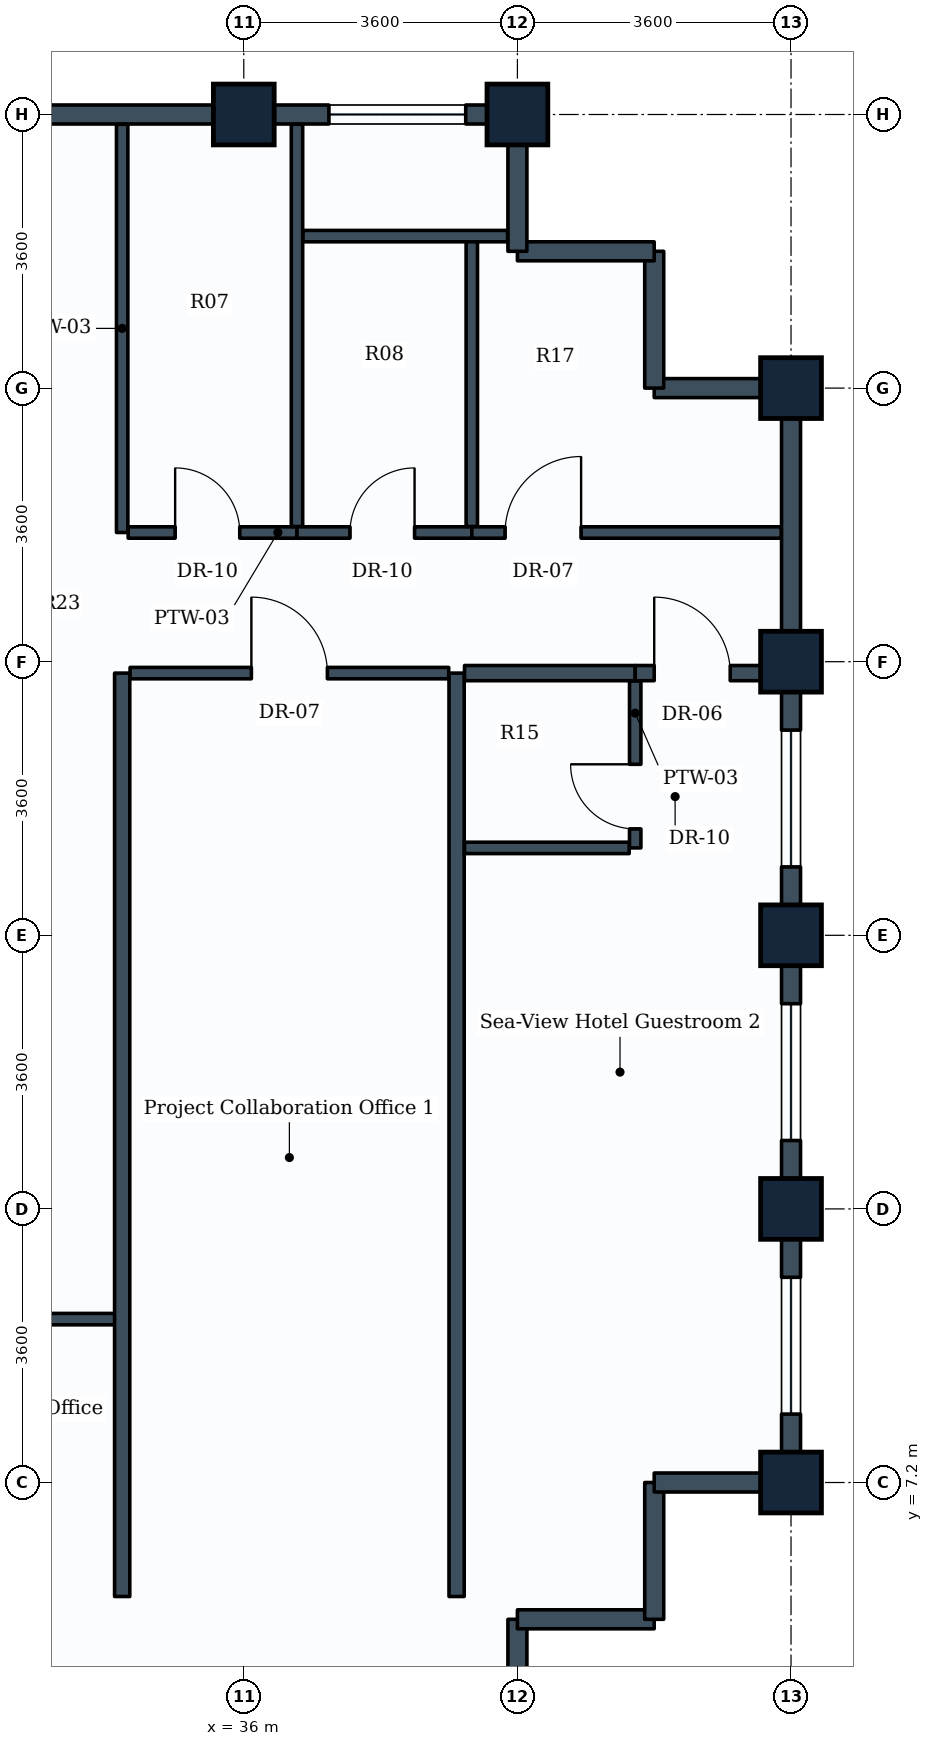
"""IFC4 building model, lengths in metres.
Left out: names, types, materials, properties, quantities, classifications, styles, units other than length and angle.
Written with IfcOpenShell. Run it as: python <this file> out.ifc"""

import sys

from ifc_helpers import new_model, si_unit, direction, frame, frame_2d, origin, origin_2d, place, context, subcontext, project, spatial, rectangle, extrude, element, fill, save


model = new_model("IFC4")
c1 = context("Model", 3, precision=1e-05, world=origin(), true_north=direction((0.0, 1.0)))
c2 = subcontext(c1, "Body", "Model", "MODEL_VIEW")
j1 = project(units=[si_unit("LENGTHUNIT", "METRE"), si_unit("PLANEANGLEUNIT", "RADIAN")], contexts=[c1])
p1 = place(None, origin())
s1 = spatial("IfcSite", under=j1, at=p1, CompositionType="ELEMENT")
p2 = place(p1, origin())
s2 = spatial("IfcBuilding", under=s1, at=p2, CompositionType="ELEMENT")
p3 = place(p2, frame((0.0, 0.0, 235.4)))
s3 = spatial("IfcBuildingStorey", under=s2, at=p3, CompositionType="ELEMENT", Elevation=235.4)
for number, where, z_axis, x_axis in (
    (1, (36.0, 25.2, 0.0), (0.0, 0.0, 1.0), (1.0, 0.0, 0.0)),
    (2, (39.6, 25.2, 0.0), (0.0, 0.0, 1.0), (1.0, 0.0, 0.0)),
    (3, (43.2, 7.2, 0.0), (0.0, 0.0, 1.0), (1.0, 0.0, 0.0)),
    (4, (43.2, 10.8, 0.0), (0.0, 0.0, 1.0), (0.0, 1.0, 0.0)),
    (5, (43.2, 14.4, 0.0), (0.0, 0.0, 1.0), (0.0, 1.0, 0.0)),
    (6, (43.2, 18.0, 0.0), (0.0, 0.0, 1.0), (0.0, 1.0, 0.0)),
    (7, (43.2, 21.6, 0.0), (0.0, 0.0, 1.0), (0.0, 1.0, 0.0)),
):
    element("IfcColumn", number, at=place(p3, frame(where, z_axis=z_axis, x_axis=x_axis)), inside=s3, PredefinedType="COLUMN", context=c2, shape_type="SweptSolid", body=[
        extrude(rectangle(XDim=0.8, YDim=0.8, at=origin_2d()), origin(), (0.0, 0.0, 1.0), 3.6),
    ])
p4 = place(p3, frame((39.6, 5.4, 0.0), z_axis=(0.0, 0.0, 1.0), x_axis=(0.0, -1.0, 0.0)))
e8 = element("IfcWall", 8, at=p4, inside=s3, PredefinedType="STANDARD", context=c2, shape_type="SweptSolid", body=[
    extrude(rectangle(XDim=1.8, YDim=0.25, at=frame_2d((0.9, 0.0))), origin(), (0.0, 0.0, 1.0), 2.83),
])
p5 = place(p3, frame((41.4, 5.4, 0.0), z_axis=(0.0, 0.0, 1.0), x_axis=(-1.0, 0.0, 0.0)))
e9 = element("IfcWall", 9, at=p5, inside=s3, PredefinedType="STANDARD", context=c2, shape_type="SweptSolid", body=[
    extrude(rectangle(XDim=1.8, YDim=0.25, at=frame_2d((0.9, 0.0))), origin(), (0.0, 0.0, 1.0), 3.335),
])
p6 = place(p3, frame((41.4, 7.2, 0.0), z_axis=(0.0, 0.0, 1.0), x_axis=(0.0, -1.0, 0.0)))
e10 = element("IfcWall", 10, at=p6, inside=s3, PredefinedType="STANDARD", context=c2, shape_type="SweptSolid", body=[
    extrude(rectangle(XDim=1.8, YDim=0.25, at=frame_2d((0.9, 0.0))), origin(), (0.0, 0.0, 1.0), 3.335),
])
p7 = place(p3, frame((43.2, 7.2, 0.0), z_axis=(0.0, 0.0, 1.0), x_axis=(-1.0, 0.0, 0.0)))
e11 = element("IfcWall", 11, at=p7, inside=s3, PredefinedType="STANDARD", context=c2, shape_type="SweptSolid", body=[
    extrude(rectangle(XDim=1.8, YDim=0.25, at=frame_2d((0.9, 0.0))), origin(), (0.0, 0.0, 1.0), 2.83),
])
p8 = place(p3, frame((43.2, 10.8, 0.0), z_axis=(0.0, 0.0, 1.0), x_axis=(0.0, -1.0, 0.0)))
e12 = element("IfcWall", 12, at=p8, inside=s3, PredefinedType="STANDARD", context=c2, shape_type="SweptSolid", body=[
    extrude(rectangle(XDim=3.6, YDim=0.25, at=frame_2d((1.8, 0.0))), origin(), (0.0, 0.0, 1.0), 2.83),
])
p9 = place(p8, frame((0.9, 0.0, 0.85)))
e13 = element("IfcOpeningElement", 13, at=p9, cuts=e12, PredefinedType="OPENING", context=c2, shape_type="SweptSolid", body=[
    extrude(rectangle(XDim=1.8, YDim=1.35, at=frame_2d((0.9, 0.675))), frame((0.0, 0.135, 0.0), z_axis=(0.0, -1.0, 0.0), x_axis=(1.0, 0.0, 0.0)), (0.0, 0.0, 1.0), 0.27),
])
p10 = place(p3, frame((43.2, 14.4, 0.0), z_axis=(0.0, 0.0, 1.0), x_axis=(0.0, -1.0, 0.0)))
e14 = element("IfcWall", 14, at=p10, inside=s3, PredefinedType="STANDARD", context=c2, shape_type="SweptSolid", body=[
    extrude(rectangle(XDim=3.6, YDim=0.25, at=frame_2d((1.8, 0.0))), origin(), (0.0, 0.0, 1.0), 2.83),
])
p11 = place(p10, frame((0.9, 0.0, 0.85)))
e15 = element("IfcOpeningElement", 15, at=p11, cuts=e14, PredefinedType="OPENING", context=c2, shape_type="SweptSolid", body=[
    extrude(rectangle(XDim=1.8, YDim=1.35, at=frame_2d((0.9, 0.675))), frame((0.0, 0.135, 0.0), z_axis=(0.0, -1.0, 0.0), x_axis=(1.0, 0.0, 0.0)), (0.0, 0.0, 1.0), 0.27),
])
p12 = place(p3, frame((43.2, 18.0, 0.0), z_axis=(0.0, 0.0, 1.0), x_axis=(0.0, -1.0, 0.0)))
e16 = element("IfcWall", 16, at=p12, inside=s3, PredefinedType="STANDARD", context=c2, shape_type="SweptSolid", body=[
    extrude(rectangle(XDim=3.6, YDim=0.25, at=frame_2d((1.8, 0.0))), origin(), (0.0, 0.0, 1.0), 2.83),
])
p13 = place(p12, frame((0.9, 0.0, 0.85)))
e17 = element("IfcOpeningElement", 17, at=p13, cuts=e16, PredefinedType="OPENING", context=c2, shape_type="SweptSolid", body=[
    extrude(rectangle(XDim=1.8, YDim=1.35, at=frame_2d((0.9, 0.675))), frame((0.0, 0.135, 0.0), z_axis=(0.0, -1.0, 0.0), x_axis=(1.0, 0.0, 0.0)), (0.0, 0.0, 1.0), 0.27),
])
p14 = place(p3, frame((43.2, 21.6, 0.0), z_axis=(0.0, 0.0, 1.0), x_axis=(0.0, -1.0, 0.0)))
e18 = element("IfcWall", 18, at=p14, inside=s3, PredefinedType="STANDARD", context=c2, shape_type="SweptSolid", body=[
    extrude(rectangle(XDim=3.6, YDim=0.25, at=frame_2d((1.8, 0.0))), origin(), (0.0, 0.0, 1.0), 2.83),
])
p15 = place(p3, frame((41.4, 21.6, 0.0), z_axis=(0.0, 0.0, 1.0), x_axis=(1.0, 0.0, 0.0)))
e19 = element("IfcWall", 19, at=p15, inside=s3, PredefinedType="STANDARD", context=c2, shape_type="SweptSolid", body=[
    extrude(rectangle(XDim=1.8, YDim=0.25, at=frame_2d((0.9, 0.0))), origin(), (0.0, 0.0, 1.0), 2.83),
])
for number, where, z_axis, x_axis in (
    (20, (41.4, 23.4, 0.0), (0.0, 0.0, 1.0), (0.0, -1.0, 0.0)),
    (21, (39.6, 23.4, 0.0), (0.0, 0.0, 1.0), (1.0, 0.0, 0.0)),
):
    element("IfcWall", number, at=place(p3, frame(where, z_axis=z_axis, x_axis=x_axis)), inside=s3, PredefinedType="STANDARD", context=c2, shape_type="SweptSolid", body=[
        extrude(rectangle(XDim=1.8, YDim=0.25, at=frame_2d((0.9, 0.0))), origin(), (0.0, 0.0, 1.0), 3.335),
    ])
p16 = place(p3, frame((39.6, 25.2, 0.0), z_axis=(0.0, 0.0, 1.0), x_axis=(0.0, -1.0, 0.0)))
e22 = element("IfcWall", 22, at=p16, inside=s3, PredefinedType="STANDARD", context=c2, shape_type="SweptSolid", body=[
    extrude(rectangle(XDim=1.8, YDim=0.25, at=frame_2d((0.9, 0.0))), origin(), (0.0, 0.0, 1.0), 2.83),
])
p17 = place(p3, frame((36.0, 25.2, 0.0), z_axis=(0.0, 0.0, 1.0), x_axis=(1.0, 0.0, 0.0)))
e23 = element("IfcWall", 23, at=p17, inside=s3, PredefinedType="STANDARD", context=c2, shape_type="SweptSolid", body=[
    extrude(rectangle(XDim=3.6, YDim=0.25, at=frame_2d((1.8, 0.0))), origin(), (0.0, 0.0, 1.0), 2.83),
])
p18 = place(p17, frame((1.12, 0.0, 0.85)))
e24 = element("IfcOpeningElement", 24, at=p18, cuts=e23, PredefinedType="OPENING", context=c2, shape_type="SweptSolid", body=[
    extrude(rectangle(XDim=1.8, YDim=1.35, at=frame_2d((0.9, 0.675))), frame((0.0, 0.135, 0.0), z_axis=(0.0, -1.0, 0.0), x_axis=(1.0, 0.0, 0.0)), (0.0, 0.0, 1.0), 0.27),
])
p19 = place(p3, frame((32.4, 25.2, 0.0), z_axis=(0.0, 0.0, 1.0), x_axis=(1.0, 0.0, 0.0)))
e25 = element("IfcWall", 25, at=p19, inside=s3, PredefinedType="STANDARD", context=c2, shape_type="SweptSolid", body=[
    extrude(rectangle(XDim=3.6, YDim=0.25, at=frame_2d((1.8, 0.0))), origin(), (0.0, 0.0, 1.0), 2.83),
])
p20 = place(p3, frame((34.4, 19.7, 0.0), z_axis=(0.0, 0.0, 1.0), x_axis=(0.0, 1.0, 0.0)))
e26 = element("IfcWall", 26, at=p20, inside=s3, PredefinedType="PARTITIONING", context=c2, shape_type="SweptSolid", body=[
    extrude(rectangle(XDim=5.371, YDim=0.15, at=frame_2d((2.686, 0.0))), origin(), (0.0, 0.0, 1.0), 2.83),
])
p21 = place(p3, frame((34.479, 19.7, 0.0), z_axis=(0.0, 0.0, 1.0), x_axis=(1.0, 0.0, 0.0)))
e27 = element("IfcWall", 27, at=p21, inside=s3, PredefinedType="PARTITIONING", context=c2, shape_type="SweptSolid", body=[
    extrude(rectangle(XDim=2.221, YDim=0.15, at=frame_2d((1.11, 0.0))), origin(), (0.0, 0.0, 1.0), 3.02),
])
p22 = place(p21, frame((0.618, 0.0, 0.0)))
e28 = element("IfcOpeningElement", 28, at=p22, cuts=e27, PredefinedType="OPENING", context=c2, shape_type="SweptSolid", body=[
    extrude(rectangle(XDim=0.85, YDim=2.1, at=frame_2d((0.425, 1.05))), frame((0.0, 0.085, 0.0), z_axis=(0.0, -1.0, 0.0), x_axis=(1.0, 0.0, 0.0)), (0.0, 0.0, 1.0), 0.17),
])
p23 = place(p3, frame((36.7, 19.779, 0.0), z_axis=(0.0, 0.0, 1.0), x_axis=(0.0, 1.0, 0.0)))
e29 = element("IfcWall", 29, at=p23, inside=s3, PredefinedType="PARTITIONING", context=c2, shape_type="SweptSolid", body=[
    extrude(rectangle(XDim=5.292, YDim=0.15, at=frame_2d((2.646, 0.0))), origin(), (0.0, 0.0, 1.0), 2.83),
])
p24 = place(p3, frame((36.7, 19.7, 0.0), z_axis=(0.0, 0.0, 1.0), x_axis=(1.0, 0.0, 0.0)))
e30 = element("IfcWall", 30, at=p24, inside=s3, PredefinedType="PARTITIONING", context=c2, shape_type="SweptSolid", body=[
    extrude(rectangle(XDim=2.3, YDim=0.15, at=frame_2d((1.15, 0.0))), origin(), (0.0, 0.0, 1.0), 3.335),
])
p25 = place(p24, frame((0.697, 0.0, 0.0)))
e31 = element("IfcOpeningElement", 31, at=p25, cuts=e30, PredefinedType="OPENING", context=c2, shape_type="SweptSolid", body=[
    extrude(rectangle(XDim=0.85, YDim=2.1, at=frame_2d((0.425, 1.05))), frame((0.0, 0.085, 0.0), z_axis=(0.0, -1.0, 0.0), x_axis=(1.0, 0.0, 0.0)), (0.0, 0.0, 1.0), 0.17),
])
p26 = place(p3, frame((39.0, 19.779, 0.0), z_axis=(0.0, 0.0, 1.0), x_axis=(0.0, 1.0, 0.0)))
e32 = element("IfcWall", 32, at=p26, inside=s3, PredefinedType="PARTITIONING", context=c2, shape_type="SweptSolid", body=[
    extrude(rectangle(XDim=3.821, YDim=0.15, at=frame_2d((1.911, 0.0))), origin(), (0.0, 0.0, 1.0), 3.335),
])
p27 = place(p3, frame((36.779, 23.6, 0.0), z_axis=(0.0, 0.0, 1.0), x_axis=(1.0, 0.0, 0.0)))
e33 = element("IfcWall", 33, at=p27, inside=s3, PredefinedType="PARTITIONING", context=c2, shape_type="SweptSolid", body=[
    extrude(rectangle(XDim=2.692, YDim=0.15, at=frame_2d((1.346, 0.0))), origin(), (0.0, 0.0, 1.0), 3.335),
])
p28 = place(p3, frame((28.879, 9.35, 0.0), z_axis=(0.0, 0.0, 1.0), x_axis=(1.0, 0.0, 0.0)))
e34 = element("IfcWall", 34, at=p28, inside=s3, PredefinedType="PARTITIONING", context=c2, shape_type="SweptSolid", body=[
    extrude(rectangle(XDim=5.521, YDim=0.15, at=frame_2d((2.76, 0.0))), origin(), (0.0, 0.0, 1.0), 3.335),
])
p29 = place(p28, frame((0.36, 0.0, 0.0)))
e35 = element("IfcOpeningElement", 35, at=p29, cuts=e34, PredefinedType="OPENING", context=c2, shape_type="SweptSolid", body=[
    extrude(rectangle(XDim=1.0, YDim=2.1, at=frame_2d((0.5, 1.05))), frame((0.0, 0.085, 0.0), z_axis=(0.0, -1.0, 0.0), x_axis=(1.0, 0.0, 0.0)), (0.0, 0.0, 1.0), 0.17),
])
for number, where, z_axis, x_axis in (
    (36, (34.4, 5.7, 0.0), (0.0, 0.0, 1.0), (0.0, 1.0, 0.0)),
    (37, (38.8, 5.7, 0.0), (0.0, 0.0, 1.0), (0.0, 1.0, 0.0)),
):
    element("IfcWall", number, at=place(p3, frame(where, z_axis=z_axis, x_axis=x_axis)), inside=s3, PredefinedType="PARTITIONING", context=c2, shape_type="SweptSolid", body=[
        extrude(rectangle(XDim=12.15, YDim=0.2, at=frame_2d((6.075, 0.0))), origin(), (0.0, 0.0, 1.0), 3.03),
    ])
p30 = place(p3, frame((34.504, 17.85, 0.0), z_axis=(0.0, 0.0, 1.0), x_axis=(1.0, 0.0, 0.0)))
e38 = element("IfcWall", 38, at=p30, inside=s3, PredefinedType="PARTITIONING", context=c2, shape_type="SweptSolid", body=[
    extrude(rectangle(XDim=4.192, YDim=0.15, at=frame_2d((2.096, 0.0))), origin(), (0.0, 0.0, 1.0), 3.02),
])
p31 = place(p30, frame((1.596, 0.0, 0.0)))
e39 = element("IfcOpeningElement", 39, at=p31, cuts=e38, PredefinedType="OPENING", context=c2, shape_type="SweptSolid", body=[
    extrude(rectangle(XDim=1.0, YDim=2.1, at=frame_2d((0.5, 1.05))), frame((0.0, 0.085, 0.0), z_axis=(0.0, -1.0, 0.0), x_axis=(1.0, 0.0, 0.0)), (0.0, 0.0, 1.0), 0.17),
])
p32 = place(p3, frame((38.904, 17.85, 0.0), z_axis=(0.0, 0.0, 1.0), x_axis=(1.0, 0.0, 0.0)))
e40 = element("IfcWall", 40, at=p32, inside=s3, PredefinedType="PARTITIONING", context=c2, shape_type="SweptSolid", body=[
    extrude(rectangle(XDim=2.246, YDim=0.2, at=frame_2d((1.123, 0.0))), origin(), (0.0, 0.0, 1.0), 3.335),
])
p33 = place(p3, frame((41.15, 17.85, 0.0), z_axis=(0.0, 0.0, 1.0), x_axis=(1.0, 0.0, 0.0)))
e41 = element("IfcWall", 41, at=p33, inside=s3, PredefinedType="PARTITIONING", context=c2, shape_type="SweptSolid", body=[
    extrude(rectangle(XDim=1.921, YDim=0.2, at=frame_2d((0.96, 0.0))), origin(), (0.0, 0.0, 1.0), 2.83),
])
p34 = place(p33, frame((0.25, 0.0, 0.0)))
e42 = element("IfcOpeningElement", 42, at=p34, cuts=e41, PredefinedType="OPENING", context=c2, shape_type="SweptSolid", body=[
    extrude(rectangle(XDim=1.0, YDim=2.1, at=frame_2d((0.5, 1.05))), frame((0.0, 0.11, 0.0), z_axis=(0.0, -1.0, 0.0), x_axis=(1.0, 0.0, 0.0)), (0.0, 0.0, 1.0), 0.22),
])
p35 = place(p3, frame((41.15, 15.55, 0.0), z_axis=(0.0, 0.0, 1.0), x_axis=(0.0, 1.0, 0.0)))
e43 = element("IfcWall", 43, at=p35, inside=s3, PredefinedType="PARTITIONING", context=c2, shape_type="SweptSolid", body=[
    extrude(rectangle(XDim=2.196, YDim=0.15, at=frame_2d((1.098, 0.0))), origin(), (0.0, 0.0, 1.0), 3.335),
])
p36 = place(p35, frame((0.25, 0.0, 0.0)))
e44 = element("IfcOpeningElement", 44, at=p36, cuts=e43, PredefinedType="OPENING", context=c2, shape_type="SweptSolid", body=[
    extrude(rectangle(XDim=0.85, YDim=2.1, at=frame_2d((0.425, 1.05))), frame((0.0, 0.085, 0.0), z_axis=(0.0, -1.0, 0.0), x_axis=(1.0, 0.0, 0.0)), (0.0, 0.0, 1.0), 0.17),
])
p37 = place(p3, frame((38.904, 15.55, 0.0), z_axis=(0.0, 0.0, 1.0), x_axis=(1.0, 0.0, 0.0)))
e45 = element("IfcWall", 45, at=p37, inside=s3, PredefinedType="PARTITIONING", context=c2, shape_type="SweptSolid", body=[
    extrude(rectangle(XDim=2.167, YDim=0.15, at=frame_2d((1.083, 0.0))), origin(), (0.0, 0.0, 1.0), 3.335),
])
p38 = place(p3, frame((39.0, 19.7, 0.0), z_axis=(0.0, 0.0, 1.0), x_axis=(1.0, 0.0, 0.0)))
e46 = element("IfcWall", 46, at=p38, inside=s3, PredefinedType="PARTITIONING", context=c2, shape_type="SweptSolid", body=[
    extrude(rectangle(XDim=4.071, YDim=0.15, at=frame_2d((2.036, 0.0))), origin(), (0.0, 0.0, 1.0), 2.83),
])
p39 = place(p38, frame((0.438, 0.0, 0.0)))
e47 = element("IfcOpeningElement", 47, at=p39, cuts=e46, PredefinedType="OPENING", context=c2, shape_type="SweptSolid", body=[
    extrude(rectangle(XDim=1.0, YDim=2.1, at=frame_2d((0.5, 1.05))), frame((0.0, 0.085, 0.0), z_axis=(0.0, -1.0, 0.0), x_axis=(1.0, 0.0, 0.0)), (0.0, 0.0, 1.0), 0.17),
])
p40 = place(p9, origin())
e48 = element("IfcWindow", 48, at=p40, inside=s3, PartitioningType="SINGLE_PANEL", PredefinedType="WINDOW", context=c2, shape_type="SweptSolid", body=[
    extrude(rectangle(XDim=1.8, YDim=1.35, at=frame_2d((0.9, 0.675))), frame((0.0, 0.03, 0.0), z_axis=(0.0, -1.0, 0.0), x_axis=(1.0, 0.0, 0.0)), (0.0, 0.0, 1.0), 0.06),
])
fill(e13, e48)
p41 = place(p11, origin())
e49 = element("IfcWindow", 49, at=p41, inside=s3, PartitioningType="SINGLE_PANEL", PredefinedType="WINDOW", context=c2, shape_type="SweptSolid", body=[
    extrude(rectangle(XDim=1.8, YDim=1.35, at=frame_2d((0.9, 0.675))), frame((0.0, 0.03, 0.0), z_axis=(0.0, -1.0, 0.0), x_axis=(1.0, 0.0, 0.0)), (0.0, 0.0, 1.0), 0.06),
])
fill(e15, e49)
p42 = place(p13, origin())
e50 = element("IfcWindow", 50, at=p42, inside=s3, PartitioningType="SINGLE_PANEL", PredefinedType="WINDOW", context=c2, shape_type="SweptSolid", body=[
    extrude(rectangle(XDim=1.8, YDim=1.35, at=frame_2d((0.9, 0.675))), frame((0.0, 0.03, 0.0), z_axis=(0.0, -1.0, 0.0), x_axis=(1.0, 0.0, 0.0)), (0.0, 0.0, 1.0), 0.06),
])
fill(e17, e50)
p43 = place(p18, origin())
e51 = element("IfcWindow", 51, at=p43, inside=s3, PartitioningType="SINGLE_PANEL", PredefinedType="WINDOW", context=c2, shape_type="SweptSolid", body=[
    extrude(rectangle(XDim=1.8, YDim=1.35, at=frame_2d((0.9, 0.675))), frame((0.0, 0.03, 0.0), z_axis=(0.0, -1.0, 0.0), x_axis=(1.0, 0.0, 0.0)), (0.0, 0.0, 1.0), 0.06),
])
fill(e24, e51)
p44 = place(p22, origin())
e52 = element("IfcDoor", 52, at=p44, inside=s3, OperationType="SINGLE_SWING_LEFT", PredefinedType="DOOR", context=c2, shape_type="SweptSolid", body=[
    extrude(rectangle(XDim=0.85, YDim=2.1, at=frame_2d((0.425, 1.05))), frame((0.0, 0.025, 0.0), z_axis=(0.0, -1.0, 0.0), x_axis=(1.0, 0.0, 0.0)), (0.0, 0.0, 1.0), 0.05),
])
fill(e28, e52)
p45 = place(p25, origin())
e53 = element("IfcDoor", 53, at=p45, inside=s3, OperationType="SINGLE_SWING_RIGHT", PredefinedType="DOOR", context=c2, shape_type="SweptSolid", body=[
    extrude(rectangle(XDim=0.85, YDim=2.1, at=frame_2d((0.425, 1.05))), frame((0.0, 0.025, 0.0), z_axis=(0.0, -1.0, 0.0), x_axis=(1.0, 0.0, 0.0)), (0.0, 0.0, 1.0), 0.05),
])
fill(e31, e53)
p46 = place(p31, origin())
e54 = element("IfcDoor", 54, at=p46, inside=s3, OperationType="SINGLE_SWING_LEFT", PredefinedType="DOOR", context=c2, shape_type="SweptSolid", body=[
    extrude(rectangle(XDim=1.0, YDim=2.1, at=frame_2d((0.5, 1.05))), frame((0.0, 0.025, 0.0), z_axis=(0.0, -1.0, 0.0), x_axis=(1.0, 0.0, 0.0)), (0.0, 0.0, 1.0), 0.05),
])
fill(e39, e54)
p47 = place(p34, origin())
e55 = element("IfcDoor", 55, at=p47, inside=s3, OperationType="SINGLE_SWING_LEFT", PredefinedType="DOOR", context=c2, shape_type="SweptSolid", body=[
    extrude(rectangle(XDim=1.0, YDim=2.1, at=frame_2d((0.5, 1.05))), frame((0.0, 0.025, 0.0), z_axis=(0.0, -1.0, 0.0), x_axis=(1.0, 0.0, 0.0)), (0.0, 0.0, 1.0), 0.05),
])
fill(e42, e55)
p48 = place(p36, origin())
e56 = element("IfcDoor", 56, at=p48, inside=s3, OperationType="SINGLE_SWING_RIGHT", PredefinedType="DOOR", context=c2, shape_type="SweptSolid", body=[
    extrude(rectangle(XDim=0.85, YDim=2.1, at=frame_2d((0.425, 1.05))), frame((0.0, 0.025, 0.0), z_axis=(0.0, -1.0, 0.0), x_axis=(1.0, 0.0, 0.0)), (0.0, 0.0, 1.0), 0.05),
])
fill(e44, e56)
p49 = place(p39, origin())
e57 = element("IfcDoor", 57, at=p49, inside=s3, OperationType="SINGLE_SWING_RIGHT", PredefinedType="DOOR", context=c2, shape_type="SweptSolid", body=[
    extrude(rectangle(XDim=1.0, YDim=2.1, at=frame_2d((0.5, 1.05))), frame((0.0, 0.025, 0.0), z_axis=(0.0, -1.0, 0.0), x_axis=(1.0, 0.0, 0.0)), (0.0, 0.0, 1.0), 0.05),
])
fill(e47, e57)
save(model, sys.argv[1])
